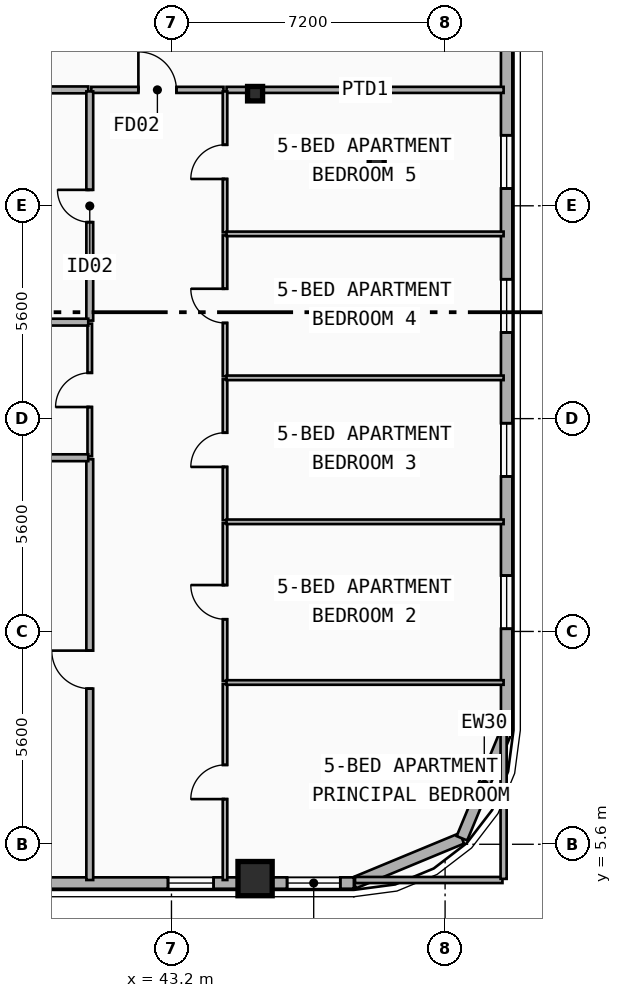
"""IFC4 building model, lengths in metres.
Left out: names, types, materials, properties, quantities, classifications, styles, units other than length and angle.
Written with IfcOpenShell. Run it as: python <this file> out.ifc"""

import sys

from ifc_helpers import new_model, si_unit, direction, frame, frame_2d, origin, origin_2d, place, context, subcontext, project, spatial, rectangle, i_section, extrude, element, fill, save


model = new_model("IFC4")
c1 = context("Model", 3, precision=1e-05, world=origin(), true_north=direction((0.0, 1.0)))
c2 = subcontext(c1, "Body", "Model", "MODEL_VIEW")
j1 = project(units=[si_unit("LENGTHUNIT", "METRE"), si_unit("PLANEANGLEUNIT", "RADIAN")], contexts=[c1])
p1 = place(None, origin())
s1 = spatial("IfcSite", under=j1, at=p1, CompositionType="ELEMENT")
p2 = place(p1, origin())
s2 = spatial("IfcBuilding", under=s1, at=p2, CompositionType="ELEMENT")
p3 = place(p2, frame((0.0, 0.0, 236.4)))
s3 = spatial("IfcBuildingStorey", under=s2, at=p3, CompositionType="ELEMENT", Elevation=236.4)
p4 = place(p3, frame((45.4, 25.35, 0.0), z_axis=(0.0, 0.0, 1.0), x_axis=(1.0, 0.0, 0.0)))
e1 = element("IfcColumn", 1, at=p4, inside=s3, PredefinedType="COLUMN", context=c2, shape_type="SweptSolid", body=[
    extrude(i_section(OverallWidth=0.395, OverallDepth=0.38, WebThickness=0.019, FlangeThickness=0.03, FilletRadius=0.015, at=origin_2d()), origin(), (0.0, 0.0, 1.0), 3.6),
])
p5 = place(p3, frame((45.4, 4.805, 0.0), z_axis=(0.0, -0.090231265542, 0.995920839584), x_axis=(1.0, 0.0, 0.0)))
e2 = element("IfcColumn", 2, at=p5, inside=s3, PredefinedType="COLUMN", context=c2, shape_type="SweptSolid", body=[
    extrude(rectangle(XDim=0.9, YDim=0.9, at=origin_2d()), origin(), (0.0, 0.0, 1.0), 3.615),
])
p6 = place(p3, frame((48.6, 23.6, 0.0), z_axis=(0.0, 0.0, 1.0), x_axis=(1.0, 0.0, 0.0)))
e3 = element("IfcColumn", 3, at=p6, inside=s3, PredefinedType="COLUMN", context=c2, shape_type="SweptSolid", body=[
    extrude(i_section(OverallWidth=0.395, OverallDepth=0.38, WebThickness=0.019, FlangeThickness=0.03, FilletRadius=0.015, at=origin_2d()), origin(), (0.0, 0.0, 1.0), 3.6),
])
p7 = place(p3, frame((50.4, 6.977, 0.0), z_axis=(0.0, -0.079901051777, 0.996802799918), x_axis=(1.0, 0.0, 0.0)))
e4 = element("IfcColumn", 4, at=p7, inside=s3, PredefinedType="COLUMN", context=c2, shape_type="SweptSolid", body=[
    extrude(i_section(OverallWidth=0.408, OverallDepth=0.4, WebThickness=0.025, FlangeThickness=0.039, FilletRadius=0.015, at=origin_2d()), origin(), (0.0, 0.0, 1.0), 3.612),
])
p8 = place(p3, frame((50.843, 5.757, 0.0), z_axis=(0.0, 0.0, 1.0), x_axis=(-0.92389884758, -0.382636798336, 0.0)))
e5 = element("IfcWall", 5, at=p8, inside=s3, PredefinedType="SOLIDWALL", context=c2, shape_type="SweptSolid", body=[
    extrude(rectangle(XDim=3.077, YDim=0.3, at=frame_2d((1.538, 0.0))), origin(), (0.0, 0.0, 1.0), 3.34),
])
p9 = place(p3, frame((52.02, 8.6, 0.0), z_axis=(0.0, 0.0, 1.0), x_axis=(-0.382676475685, -0.923882414032, 0.0)))
e6 = element("IfcWall", 6, at=p9, inside=s3, PredefinedType="SOLIDWALL", context=c2, shape_type="SweptSolid", body=[
    extrude(rectangle(XDim=3.077, YDim=0.3, at=frame_2d((1.539, 0.0))), origin(), (0.0, 0.0, 1.0), 3.34),
])
p10 = place(p3, frame((52.02, 37.2, 0.0), z_axis=(0.0, 0.0, 1.0), x_axis=(0.0, -1.0, 0.0)))
e7 = element("IfcWall", 7, at=p10, inside=s3, PredefinedType="SOLIDWALL", context=c2, shape_type="SweptSolid", body=[
    extrude(rectangle(XDim=28.6, YDim=0.3, at=frame_2d((14.3, 0.0))), origin(), (0.0, 0.0, 1.0), 3.34),
])
p11 = place(p10, frame((2.38, 0.0, 0.34)))
e8 = element("IfcOpeningElement", 8, at=p11, cuts=e7, PredefinedType="OPENING", context=c2, shape_type="SweptSolid", body=[
    extrude(rectangle(XDim=1.4, YDim=2.1, at=frame_2d((0.7, 1.05))), frame((0.0, 0.16, 0.0), z_axis=(0.0, -1.0, 0.0), x_axis=(1.0, 0.0, 0.0)), (0.0, 0.0, 1.0), 0.32),
])
p12 = place(p10, frame((5.84, 0.0, 0.34)))
e9 = element("IfcOpeningElement", 9, at=p12, cuts=e7, PredefinedType="OPENING", context=c2, shape_type="SweptSolid", body=[
    extrude(rectangle(XDim=1.4, YDim=2.1, at=frame_2d((0.7, 1.05))), frame((0.0, 0.16, 0.0), z_axis=(0.0, -1.0, 0.0), x_axis=(1.0, 0.0, 0.0)), (0.0, 0.0, 1.0), 0.32),
])
p13 = place(p10, frame((24.529, 0.0, 0.34)))
e10 = element("IfcOpeningElement", 10, at=p13, cuts=e7, PredefinedType="OPENING", context=c2, shape_type="SweptSolid", body=[
    extrude(rectangle(XDim=1.4, YDim=2.1, at=frame_2d((0.7, 1.05))), frame((0.0, 0.16, 0.0), z_axis=(0.0, -1.0, 0.0), x_axis=(1.0, 0.0, 0.0)), (0.0, 0.0, 1.0), 0.32),
])
p14 = place(p10, frame((20.521, 0.0, 0.34)))
e11 = element("IfcOpeningElement", 11, at=p14, cuts=e7, PredefinedType="OPENING", context=c2, shape_type="SweptSolid", body=[
    extrude(rectangle(XDim=1.4, YDim=2.1, at=frame_2d((0.7, 1.05))), frame((0.0, 0.16, 0.0), z_axis=(0.0, -1.0, 0.0), x_axis=(1.0, 0.0, 0.0)), (0.0, 0.0, 1.0), 0.32),
])
p15 = place(p10, frame((16.733, 0.0, 0.34)))
e12 = element("IfcOpeningElement", 12, at=p15, cuts=e7, PredefinedType="OPENING", context=c2, shape_type="SweptSolid", body=[
    extrude(rectangle(XDim=1.4, YDim=2.1, at=frame_2d((0.7, 1.05))), frame((0.0, 0.16, 0.0), z_axis=(0.0, -1.0, 0.0), x_axis=(1.0, 0.0, 0.0)), (0.0, 0.0, 1.0), 0.32),
])
p16 = place(p10, frame((12.945, 0.0, 0.34)))
e13 = element("IfcOpeningElement", 13, at=p16, cuts=e7, PredefinedType="OPENING", context=c2, shape_type="SweptSolid", body=[
    extrude(rectangle(XDim=1.4, YDim=2.1, at=frame_2d((0.7, 1.05))), frame((0.0, 0.16, 0.0), z_axis=(0.0, -1.0, 0.0), x_axis=(1.0, 0.0, 0.0)), (0.0, 0.0, 1.0), 0.32),
])
p17 = place(p3, frame((48.0, 4.58, 0.0), z_axis=(0.0, 0.0, 1.0), x_axis=(-1.0, 0.0, 0.0)))
e14 = element("IfcWall", 14, at=p17, inside=s3, PredefinedType="SOLIDWALL", context=c2, shape_type="SweptSolid", body=[
    extrude(rectangle(XDim=38.4, YDim=0.3, at=frame_2d((19.2, 0.0))), origin(), (0.0, 0.0, 1.0), 3.0),
])
p18 = place(p17, frame((33.795, 0.0, 1.22)))
e15 = element("IfcOpeningElement", 15, at=p18, cuts=e14, PredefinedType="OPENING", context=c2, shape_type="SweptSolid", body=[
    extrude(rectangle(XDim=1.2, YDim=1.5, at=frame_2d((0.6, 0.75))), frame((0.0, 0.16, 0.0), z_axis=(0.0, -1.0, 0.0), x_axis=(1.0, 0.0, 0.0)), (0.0, 0.0, 1.0), 0.32),
])
p19 = place(p17, frame((14.425, 0.0, 0.62)))
e16 = element("IfcOpeningElement", 16, at=p19, cuts=e14, PredefinedType="OPENING", context=c2, shape_type="SweptSolid", body=[
    extrude(rectangle(XDim=2.0, YDim=2.2, at=frame_2d((1.0, 1.1))), frame((0.0, 0.16, 0.0), z_axis=(0.0, -1.0, 0.0), x_axis=(1.0, 0.0, 0.0)), (0.0, 0.0, 1.0), 0.32),
])
p20 = place(p17, frame((3.691, 0.0, 0.48)))
e17 = element("IfcOpeningElement", 17, at=p20, cuts=e14, PredefinedType="OPENING", context=c2, shape_type="SweptSolid", body=[
    extrude(rectangle(XDim=1.2, YDim=1.5, at=frame_2d((0.6, 0.75))), frame((0.0, 0.16, 0.0), z_axis=(0.0, -1.0, 0.0), x_axis=(1.0, 0.0, 0.0)), (0.0, 0.0, 1.0), 0.32),
])
p21 = place(p17, frame((8.25, 0.0, 1.68)))
e18 = element("IfcOpeningElement", 18, at=p21, cuts=e14, PredefinedType="OPENING", context=c2, shape_type="SweptSolid", body=[
    extrude(rectangle(XDim=1.1, YDim=1.05, at=frame_2d((0.55, 0.525))), frame((0.0, 0.16, 0.0), z_axis=(0.0, -1.0, 0.0), x_axis=(1.0, 0.0, 0.0)), (0.0, 0.0, 1.0), 0.32),
])
p22 = place(p17, frame((0.357, 0.0, 0.75)))
e19 = element("IfcOpeningElement", 19, at=p22, cuts=e14, PredefinedType="OPENING", context=c2, shape_type="SweptSolid", body=[
    extrude(rectangle(XDim=1.4, YDim=1.8, at=frame_2d((0.7, 0.9))), frame((0.0, 0.16, 0.0), z_axis=(0.0, -1.0, 0.0), x_axis=(1.0, 0.0, 0.0)), (0.0, 0.0, 1.0), 0.32),
])
p23 = place(p3, frame((41.09, 25.45, 0.0), z_axis=(0.0, 0.0, 1.0), x_axis=(1.0, 0.0, 0.0)))
e20 = element("IfcWall", 20, at=p23, inside=s3, PredefinedType="PARTITIONING", context=c2, shape_type="SweptSolid", body=[
    extrude(rectangle(XDim=3.479, YDim=0.16, at=frame_2d((1.74, 0.0))), origin(), (0.0, 0.0, 1.0), 3.34),
])
p24 = place(p23, frame((1.24, 0.0, 0.0)))
e21 = element("IfcOpeningElement", 21, at=p24, cuts=e20, PredefinedType="OPENING", context=c2, shape_type="SweptSolid", body=[
    extrude(rectangle(XDim=1.0, YDim=2.15, at=frame_2d((0.5, 1.075))), frame((0.0, 0.09, 0.0), z_axis=(0.0, -1.0, 0.0), x_axis=(1.0, 0.0, 0.0)), (0.0, 0.0, 1.0), 0.18),
])
p25 = place(p3, frame((38.39, 25.45, 0.0), z_axis=(0.0, 0.0, 1.0), x_axis=(1.0, 0.0, 0.0)))
e22 = element("IfcWall", 22, at=p25, inside=s3, PredefinedType="PLUMBINGWALL", context=c2, shape_type="SweptSolid", body=[
    extrude(rectangle(XDim=2.62, YDim=0.18, at=frame_2d((1.31, 0.0))), origin(), (0.0, 0.0, 1.0), 3.34),
])
p26 = place(p3, frame((44.649, 25.45, 0.0), z_axis=(0.0, 0.0, 1.0), x_axis=(1.0, 0.0, 0.0)))
e23 = element("IfcWall", 23, at=p26, inside=s3, PredefinedType="PARTITIONING", context=c2, shape_type="SweptSolid", body=[
    extrude(rectangle(XDim=7.291, YDim=0.16, at=frame_2d((3.646, 0.0))), origin(), (0.0, 0.0, 1.0), 2.62),
])
p27 = place(p3, frame((41.05, 4.66, 0.0), z_axis=(0.0, 0.0, 1.0), x_axis=(0.0, 1.0, 0.0)))
e24 = element("IfcWall", 24, at=p27, inside=s3, PredefinedType="PLUMBINGWALL", context=c2, shape_type="SweptSolid", body=[
    extrude(rectangle(XDim=11.071, YDim=0.18, at=frame_2d((5.536, 0.0))), origin(), (0.0, 0.0, 1.0), 2.88),
])
p28 = place(p27, frame((5.035, 0.0, 0.0)))
e25 = element("IfcOpeningElement", 25, at=p28, cuts=e24, PredefinedType="OPENING", context=c2, shape_type="SweptSolid", body=[
    extrude(rectangle(XDim=1.0, YDim=2.15, at=frame_2d((0.5, 1.075))), frame((0.0, 0.1, 0.0), z_axis=(0.0, -1.0, 0.0), x_axis=(1.0, 0.0, 0.0)), (0.0, 0.0, 1.0), 0.2),
])
p29 = place(p3, frame((41.05, 15.811, 0.0), z_axis=(0.0, 0.0, 1.0), x_axis=(0.0, 1.0, 0.0)))
e26 = element("IfcWall", 26, at=p29, inside=s3, PredefinedType="PARTITIONING", context=c2, shape_type="SweptSolid", body=[
    extrude(rectangle(XDim=3.488, YDim=0.12, at=frame_2d((1.744, 0.0))), origin(), (0.0, 0.0, 1.0), 2.88),
])
p30 = place(p29, frame((1.294, 0.0, 0.0)))
e27 = element("IfcOpeningElement", 27, at=p30, cuts=e26, PredefinedType="OPENING", context=c2, shape_type="SweptSolid", body=[
    extrude(rectangle(XDim=0.9, YDim=2.1, at=frame_2d((0.45, 1.05))), frame((0.0, 0.07, 0.0), z_axis=(0.0, -1.0, 0.0), x_axis=(1.0, 0.0, 0.0)), (0.0, 0.0, 1.0), 0.14),
])
p31 = place(p3, frame((41.05, 19.379, 0.0), z_axis=(0.0, 0.0, 1.0), x_axis=(0.0, 1.0, 0.0)))
e28 = element("IfcWall", 28, at=p31, inside=s3, PredefinedType="PLUMBINGWALL", context=c2, shape_type="SweptSolid", body=[
    extrude(rectangle(XDim=6.031, YDim=0.18, at=frame_2d((3.016, 0.0))), origin(), (0.0, 0.0, 1.0), 2.88),
])
p32 = place(p31, frame((2.591, 0.0, 0.0)))
e29 = element("IfcOpeningElement", 29, at=p32, cuts=e28, PredefinedType="OPENING", context=c2, shape_type="SweptSolid", body=[
    extrude(rectangle(XDim=0.85, YDim=2.1, at=frame_2d((0.425, 1.05))), frame((0.0, 0.1, 0.0), z_axis=(0.0, -1.0, 0.0), x_axis=(1.0, 0.0, 0.0)), (0.0, 0.0, 1.0), 0.2),
])
p33 = place(p3, frame((44.609, 4.66, 0.0), z_axis=(0.0, 0.0, 1.0), x_axis=(0.0, 1.0, 0.0)))
e30 = element("IfcWall", 30, at=p33, inside=s3, PredefinedType="PARTITIONING", context=c2, shape_type="SweptSolid", body=[
    extrude(rectangle(XDim=5.157, YDim=0.12, at=frame_2d((2.579, 0.0))), origin(), (0.0, 0.0, 1.0), 2.88),
])
p34 = place(p33, frame((2.128, 0.0, 0.0)))
e31 = element("IfcOpeningElement", 31, at=p34, cuts=e30, PredefinedType="OPENING", context=c2, shape_type="SweptSolid", body=[
    extrude(rectangle(XDim=0.9, YDim=2.1, at=frame_2d((0.45, 1.05))), frame((0.0, 0.07, 0.0), z_axis=(0.0, -1.0, 0.0), x_axis=(1.0, 0.0, 0.0)), (0.0, 0.0, 1.0), 0.14),
])
p35 = place(p3, frame((44.609, 9.897, 0.0), z_axis=(0.0, 0.0, 1.0), x_axis=(0.0, 1.0, 0.0)))
e32 = element("IfcWall", 32, at=p35, inside=s3, PredefinedType="PARTITIONING", context=c2, shape_type="SweptSolid", body=[
    extrude(rectangle(XDim=4.148, YDim=0.12, at=frame_2d((2.074, 0.0))), origin(), (0.0, 0.0, 1.0), 3.01),
])
p36 = place(p35, frame((1.624, 0.0, 0.0)))
e33 = element("IfcOpeningElement", 33, at=p36, cuts=e32, PredefinedType="OPENING", context=c2, shape_type="SweptSolid", body=[
    extrude(rectangle(XDim=0.9, YDim=2.1, at=frame_2d((0.45, 1.05))), frame((0.0, 0.07, 0.0), z_axis=(0.0, -1.0, 0.0), x_axis=(1.0, 0.0, 0.0)), (0.0, 0.0, 1.0), 0.14),
])
p37 = place(p3, frame((44.609, 14.125, 0.0), z_axis=(0.0, 0.0, 1.0), x_axis=(0.0, 1.0, 0.0)))
e34 = element("IfcWall", 34, at=p37, inside=s3, PredefinedType="PARTITIONING", context=c2, shape_type="SweptSolid", body=[
    extrude(rectangle(XDim=3.708, YDim=0.12, at=frame_2d((1.854, 0.0))), origin(), (0.0, 0.0, 1.0), 2.88),
])
p38 = place(p37, frame((1.404, 0.0, 0.0)))
e35 = element("IfcOpeningElement", 35, at=p38, cuts=e34, PredefinedType="OPENING", context=c2, shape_type="SweptSolid", body=[
    extrude(rectangle(XDim=0.9, YDim=2.1, at=frame_2d((0.45, 1.05))), frame((0.0, 0.07, 0.0), z_axis=(0.0, -1.0, 0.0), x_axis=(1.0, 0.0, 0.0)), (0.0, 0.0, 1.0), 0.14),
])
p39 = place(p3, frame((44.609, 17.913, 0.0), z_axis=(0.0, 0.0, 1.0), x_axis=(0.0, 1.0, 0.0)))
e36 = element("IfcWall", 36, at=p39, inside=s3, PredefinedType="PARTITIONING", context=c2, shape_type="SweptSolid", body=[
    extrude(rectangle(XDim=3.708, YDim=0.12, at=frame_2d((1.854, 0.0))), origin(), (0.0, 0.0, 1.0), 3.01),
])
p40 = place(p39, frame((1.404, 0.0, 0.0)))
e37 = element("IfcOpeningElement", 37, at=p40, cuts=e36, PredefinedType="OPENING", context=c2, shape_type="SweptSolid", body=[
    extrude(rectangle(XDim=0.9, YDim=2.1, at=frame_2d((0.45, 1.05))), frame((0.0, 0.07, 0.0), z_axis=(0.0, -1.0, 0.0), x_axis=(1.0, 0.0, 0.0)), (0.0, 0.0, 1.0), 0.14),
])
p41 = place(p3, frame((44.609, 21.701, 0.0), z_axis=(0.0, 0.0, 1.0), x_axis=(0.0, 1.0, 0.0)))
e38 = element("IfcWall", 38, at=p41, inside=s3, PredefinedType="PARTITIONING", context=c2, shape_type="SweptSolid", body=[
    extrude(rectangle(XDim=3.709, YDim=0.12, at=frame_2d((1.854, 0.0))), origin(), (0.0, 0.0, 1.0), 2.88),
])
p42 = place(p41, frame((1.405, 0.0, 0.0)))
e39 = element("IfcOpeningElement", 39, at=p42, cuts=e38, PredefinedType="OPENING", context=c2, shape_type="SweptSolid", body=[
    extrude(rectangle(XDim=0.9, YDim=2.1, at=frame_2d((0.45, 1.05))), frame((0.0, 0.07, 0.0), z_axis=(0.0, -1.0, 0.0), x_axis=(1.0, 0.0, 0.0)), (0.0, 0.0, 1.0), 0.14),
])
p43 = place(p3, frame((38.39, 15.771, 0.0), z_axis=(0.0, 0.0, 1.0), x_axis=(1.0, 0.0, 0.0)))
e40 = element("IfcWall", 40, at=p43, inside=s3, PredefinedType="PLUMBINGWALL", context=c2, shape_type="SweptSolid", body=[
    extrude(rectangle(XDim=2.62, YDim=0.18, at=frame_2d((1.31, 0.0))), origin(), (0.0, 0.0, 1.0), 2.88),
])
p44 = place(p3, frame((38.39, 19.339, 0.0), z_axis=(0.0, 0.0, 1.0), x_axis=(1.0, 0.0, 0.0)))
e41 = element("IfcWall", 41, at=p44, inside=s3, PredefinedType="PLUMBINGWALL", context=c2, shape_type="SweptSolid", body=[
    extrude(rectangle(XDim=2.62, YDim=0.18, at=frame_2d((1.31, 0.0))), origin(), (0.0, 0.0, 1.0), 3.01),
])
for number, where, z_axis, x_axis in (
    (42, (44.649, 9.857, 0.0), (0.0, 0.0, 1.0), (1.0, 0.0, 0.0)),
    (43, (44.649, 14.085, 0.0), (0.0, 0.0, 1.0), (1.0, 0.0, 0.0)),
    (44, (44.649, 17.873, 0.0), (0.0, 0.0, 1.0), (1.0, 0.0, 0.0)),
    (45, (44.649, 21.661, 0.0), (0.0, 0.0, 1.0), (1.0, 0.0, 0.0)),
):
    element("IfcWall", number, at=place(p3, frame(where, z_axis=z_axis, x_axis=x_axis)), inside=s3, PredefinedType="PARTITIONING", context=c2, shape_type="SweptSolid", body=[
        extrude(rectangle(XDim=7.291, YDim=0.12, at=frame_2d((3.646, 0.0))), origin(), (0.0, 0.0, 1.0), 2.62),
    ])
p45 = place(p3, frame((48.03, 4.66, 0.0), z_axis=(0.0, 0.0, 1.0), x_axis=(1.0, 0.0, 0.0)))
e46 = element("IfcWall", 46, at=p45, inside=s3, PredefinedType="PARTITIONING", context=c2, shape_type="SweptSolid", body=[
    extrude(rectangle(XDim=3.88, YDim=0.16, at=frame_2d((1.94, 0.0))), origin(), (0.0, 0.0, 1.0), 3.34),
])
p46 = place(p3, frame((51.94, 4.69, 0.0), z_axis=(0.0, 0.0, 1.0), x_axis=(0.0, 1.0, 0.0)))
e47 = element("IfcWall", 47, at=p46, inside=s3, PredefinedType="PARTITIONING", context=c2, shape_type="SweptSolid", body=[
    extrude(rectangle(XDim=3.88, YDim=0.16, at=frame_2d((1.94, 0.0))), origin(), (0.0, 0.0, 1.0), 3.34),
])
p47 = place(p13, origin())
e48 = element("IfcWindow", 48, at=p47, inside=s3, PartitioningType="SINGLE_PANEL", PredefinedType="WINDOW", context=c2, shape_type="SweptSolid", body=[
    extrude(rectangle(XDim=1.4, YDim=2.1, at=frame_2d((0.7, 1.05))), frame((0.0, 0.03, 0.0), z_axis=(0.0, -1.0, 0.0), x_axis=(1.0, 0.0, 0.0)), (0.0, 0.0, 1.0), 0.06),
])
fill(e10, e48)
p48 = place(p14, origin())
e49 = element("IfcWindow", 49, at=p48, inside=s3, PartitioningType="SINGLE_PANEL", PredefinedType="WINDOW", context=c2, shape_type="SweptSolid", body=[
    extrude(rectangle(XDim=1.4, YDim=2.1, at=frame_2d((0.7, 1.05))), frame((0.0, 0.03, 0.0), z_axis=(0.0, -1.0, 0.0), x_axis=(1.0, 0.0, 0.0)), (0.0, 0.0, 1.0), 0.06),
])
fill(e11, e49)
p49 = place(p15, origin())
e50 = element("IfcWindow", 50, at=p49, inside=s3, PartitioningType="SINGLE_PANEL", PredefinedType="WINDOW", context=c2, shape_type="SweptSolid", body=[
    extrude(rectangle(XDim=1.4, YDim=2.1, at=frame_2d((0.7, 1.05))), frame((0.0, 0.03, 0.0), z_axis=(0.0, -1.0, 0.0), x_axis=(1.0, 0.0, 0.0)), (0.0, 0.0, 1.0), 0.06),
])
fill(e12, e50)
p50 = place(p16, origin())
e51 = element("IfcWindow", 51, at=p50, inside=s3, PartitioningType="SINGLE_PANEL", PredefinedType="WINDOW", context=c2, shape_type="SweptSolid", body=[
    extrude(rectangle(XDim=1.4, YDim=2.1, at=frame_2d((0.7, 1.05))), frame((0.0, 0.03, 0.0), z_axis=(0.0, -1.0, 0.0), x_axis=(1.0, 0.0, 0.0)), (0.0, 0.0, 1.0), 0.06),
])
fill(e13, e51)
p51 = place(p20, origin())
e52 = element("IfcWindow", 52, at=p51, inside=s3, PartitioningType="SINGLE_PANEL", PredefinedType="WINDOW", context=c2, shape_type="SweptSolid", body=[
    extrude(rectangle(XDim=1.2, YDim=1.5, at=frame_2d((0.6, 0.75))), frame((0.0, 0.03, 0.0), z_axis=(0.0, -1.0, 0.0), x_axis=(1.0, 0.0, 0.0)), (0.0, 0.0, 1.0), 0.06),
])
fill(e17, e52)
p52 = place(p22, origin())
e53 = element("IfcWindow", 53, at=p52, inside=s3, PartitioningType="SINGLE_PANEL", PredefinedType="WINDOW", context=c2, shape_type="SweptSolid", body=[
    extrude(rectangle(XDim=1.4, YDim=1.8, at=frame_2d((0.7, 0.9))), frame((0.0, 0.03, 0.0), z_axis=(0.0, -1.0, 0.0), x_axis=(1.0, 0.0, 0.0)), (0.0, 0.0, 1.0), 0.06),
])
fill(e19, e53)
p53 = place(p24, origin())
e54 = element("IfcDoor", 54, at=p53, inside=s3, OperationType="SINGLE_SWING_LEFT", PredefinedType="DOOR", context=c2, shape_type="SweptSolid", body=[
    extrude(rectangle(XDim=1.0, YDim=2.15, at=frame_2d((0.5, 1.075))), frame((0.0, 0.025, 0.0), z_axis=(0.0, -1.0, 0.0), x_axis=(1.0, 0.0, 0.0)), (0.0, 0.0, 1.0), 0.05),
])
fill(e21, e54)
p54 = place(p28, origin())
e55 = element("IfcDoor", 55, at=p54, inside=s3, OperationType="SINGLE_SWING_RIGHT", PredefinedType="DOOR", context=c2, shape_type="SweptSolid", body=[
    extrude(rectangle(XDim=1.0, YDim=2.15, at=frame_2d((0.5, 1.075))), frame((0.0, 0.025, 0.0), z_axis=(0.0, -1.0, 0.0), x_axis=(1.0, 0.0, 0.0)), (0.0, 0.0, 1.0), 0.05),
])
fill(e25, e55)
p55 = place(p30, origin())
e56 = element("IfcDoor", 56, at=p55, inside=s3, OperationType="SINGLE_SWING_LEFT", PredefinedType="DOOR", context=c2, shape_type="SweptSolid", body=[
    extrude(rectangle(XDim=0.9, YDim=2.1, at=frame_2d((0.45, 1.05))), frame((0.0, 0.025, 0.0), z_axis=(0.0, -1.0, 0.0), x_axis=(1.0, 0.0, 0.0)), (0.0, 0.0, 1.0), 0.05),
])
fill(e27, e56)
p56 = place(p32, origin())
e57 = element("IfcDoor", 57, at=p56, inside=s3, OperationType="SINGLE_SWING_RIGHT", PredefinedType="DOOR", context=c2, shape_type="SweptSolid", body=[
    extrude(rectangle(XDim=0.85, YDim=2.1, at=frame_2d((0.425, 1.05))), frame((0.0, 0.025, 0.0), z_axis=(0.0, -1.0, 0.0), x_axis=(1.0, 0.0, 0.0)), (0.0, 0.0, 1.0), 0.05),
])
fill(e29, e57)
p57 = place(p34, origin())
e58 = element("IfcDoor", 58, at=p57, inside=s3, OperationType="SINGLE_SWING_LEFT", PredefinedType="DOOR", context=c2, shape_type="SweptSolid", body=[
    extrude(rectangle(XDim=0.9, YDim=2.1, at=frame_2d((0.45, 1.05))), frame((0.0, 0.025, 0.0), z_axis=(0.0, -1.0, 0.0), x_axis=(1.0, 0.0, 0.0)), (0.0, 0.0, 1.0), 0.05),
])
fill(e31, e58)
p58 = place(p36, origin())
e59 = element("IfcDoor", 59, at=p58, inside=s3, OperationType="SINGLE_SWING_RIGHT", PredefinedType="DOOR", context=c2, shape_type="SweptSolid", body=[
    extrude(rectangle(XDim=0.9, YDim=2.1, at=frame_2d((0.45, 1.05))), frame((0.0, 0.025, 0.0), z_axis=(0.0, -1.0, 0.0), x_axis=(1.0, 0.0, 0.0)), (0.0, 0.0, 1.0), 0.05),
])
fill(e33, e59)
p59 = place(p38, origin())
e60 = element("IfcDoor", 60, at=p59, inside=s3, OperationType="SINGLE_SWING_LEFT", PredefinedType="DOOR", context=c2, shape_type="SweptSolid", body=[
    extrude(rectangle(XDim=0.9, YDim=2.1, at=frame_2d((0.45, 1.05))), frame((0.0, 0.025, 0.0), z_axis=(0.0, -1.0, 0.0), x_axis=(1.0, 0.0, 0.0)), (0.0, 0.0, 1.0), 0.05),
])
fill(e35, e60)
p60 = place(p40, origin())
e61 = element("IfcDoor", 61, at=p60, inside=s3, OperationType="SINGLE_SWING_RIGHT", PredefinedType="DOOR", context=c2, shape_type="SweptSolid", body=[
    extrude(rectangle(XDim=0.9, YDim=2.1, at=frame_2d((0.45, 1.05))), frame((0.0, 0.025, 0.0), z_axis=(0.0, -1.0, 0.0), x_axis=(1.0, 0.0, 0.0)), (0.0, 0.0, 1.0), 0.05),
])
fill(e37, e61)
p61 = place(p42, origin())
e62 = element("IfcDoor", 62, at=p61, inside=s3, OperationType="SINGLE_SWING_LEFT", PredefinedType="DOOR", context=c2, shape_type="SweptSolid", body=[
    extrude(rectangle(XDim=0.9, YDim=2.1, at=frame_2d((0.45, 1.05))), frame((0.0, 0.025, 0.0), z_axis=(0.0, -1.0, 0.0), x_axis=(1.0, 0.0, 0.0)), (0.0, 0.0, 1.0), 0.05),
])
fill(e39, e62)
save(model, sys.argv[1])
